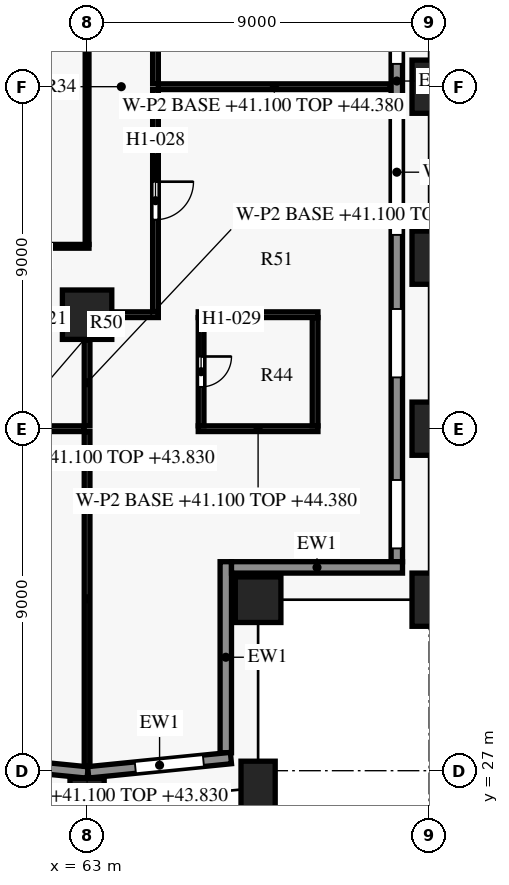
"""IFC4 building model, lengths in metres.
Left out: names, types, materials, properties, quantities, classifications, styles, units other than length and angle.
Written with IfcOpenShell. Run it as: python <this file> out.ifc"""

import sys

from ifc_helpers import new_model, si_unit, direction, frame, frame_2d, origin, origin_2d, place, context, subcontext, project, spatial, rectangle, extrude, element, fill, save


model = new_model("IFC4")
c1 = context("Model", 3, precision=1e-05, world=origin(), true_north=direction((0.0, 1.0)))
c2 = subcontext(c1, "Body", "Model", "MODEL_VIEW")
j1 = project(units=[si_unit("LENGTHUNIT", "METRE"), si_unit("PLANEANGLEUNIT", "RADIAN")], contexts=[c1])
p1 = place(None, origin())
s1 = spatial("IfcSite", under=j1, at=p1, CompositionType="ELEMENT")
p2 = place(p1, origin())
s2 = spatial("IfcBuilding", under=s1, at=p2, CompositionType="ELEMENT")
p3 = place(p2, frame((0.0, 0.0, 41.1)))
s3 = spatial("IfcBuildingStorey", under=s2, at=p3, CompositionType="ELEMENT", Elevation=41.1)
for number, where, z_axis, x_axis in (
    (1, (63.0, 26.1, 0.0), (0.0, 0.0, 1.0), (1.0, 0.0, 0.0)),
    (2, (67.5, 26.55, 0.0), (0.0, 0.0, 1.0), (0.995, 0.1, 0.0)),
    (3, (72.0, 31.5, 0.0), (0.0, 0.0, 1.0), (0.0, 1.0, 0.0)),
    (4, (72.0, 36.0, 0.0), (0.0, 0.0, 1.0), (0.0, 1.0, 0.0)),
    (5, (72.0, 40.5, 0.0), (0.0, 0.0, 1.0), (0.0, 1.0, 0.0)),
    (6, (72.0, 45.0, 0.0), (0.0, 0.0, 1.0), (0.0, 1.0, 0.0)),
):
    element("IfcColumn", number, at=place(p3, frame(where, z_axis=z_axis, x_axis=x_axis)), inside=s3, PredefinedType="COLUMN", context=c2, shape_type="SweptSolid", body=[
        extrude(rectangle(XDim=0.9, YDim=1.4, at=origin_2d()), origin(), (0.0, 0.0, 1.0), 3.6),
    ])
p4 = place(p3, frame((67.5, 31.5, 0.0), z_axis=(0.0, 0.0, 1.0), x_axis=(1.0, 0.0, 0.0)))
e7 = element("IfcColumn", 7, at=p4, inside=s3, PredefinedType="COLUMN", context=c2, shape_type="SweptSolid", body=[
    extrude(rectangle(XDim=1.2, YDim=1.2, at=origin_2d()), origin(), (0.0, 0.0, 1.0), 3.6),
])
p5 = place(p3, frame((63.0, 39.0, 0.0), z_axis=(0.0, 0.0, 1.0), x_axis=(1.0, 0.0, 0.0)))
e8 = element("IfcColumn", 8, at=p5, inside=s3, PredefinedType="COLUMN", context=c2, shape_type="SweptSolid", body=[
    extrude(rectangle(XDim=1.3, YDim=1.3, at=origin_2d()), origin(), (0.0, 0.0, 1.0), 3.6),
])
p6 = place(p3, frame((63.015, 26.953, 0.0), z_axis=(0.0, 0.0, 1.0), x_axis=(-0.995035316196, 0.099522457379, 0.0)))
e9 = element("IfcWall", 9, at=p6, inside=s3, PredefinedType="SOLIDWALL", context=c2, shape_type="SweptSolid", body=[
    extrude(rectangle(XDim=9.03, YDim=0.3, at=frame_2d((4.515, 0.0))), origin(), (0.0, 0.0, 1.0), 2.95),
])
p7 = place(p6, frame((1.291, 0.0, 0.75)))
e10 = element("IfcOpeningElement", 10, at=p7, cuts=e9, PredefinedType="OPENING", context=c2, shape_type="SweptSolid", body=[
    extrude(rectangle(XDim=1.8, YDim=1.8, at=frame_2d((0.9, 0.9))), frame((0.0, 0.16, 0.0), z_axis=(0.0, -1.0, 0.0), x_axis=(1.0, 0.0, 0.0)), (0.0, 0.0, 1.0), 0.32),
])
p8 = place(p6, frame((5.064, 0.0, 0.15)))
e11 = element("IfcOpeningElement", 11, at=p8, cuts=e9, PredefinedType="OPENING", context=c2, shape_type="SweptSolid", body=[
    extrude(rectangle(XDim=3.3, YDim=2.4, at=frame_2d((1.65, 1.2))), frame((0.0, 0.16, 0.0), z_axis=(0.0, -1.0, 0.0), x_axis=(1.0, 0.0, 0.0)), (0.0, 0.0, 1.0), 0.32),
])
p9 = place(p3, frame((66.785, 27.333, 0.0), z_axis=(0.0, 0.0, 1.0), x_axis=(-0.995038471088, -0.099490909409, 0.0)))
e12 = element("IfcWall", 12, at=p9, inside=s3, PredefinedType="SOLIDWALL", context=c2, shape_type="SweptSolid", body=[
    extrude(rectangle(XDim=3.774, YDim=0.3, at=frame_2d((1.887, 0.0))), origin(), (0.0, 0.0, 1.0), 2.95),
])
p10 = place(p9, frame((0.728, 0.0, 0.75)))
e13 = element("IfcOpeningElement", 13, at=p10, cuts=e12, PredefinedType="OPENING", context=c2, shape_type="SweptSolid", body=[
    extrude(rectangle(XDim=1.8, YDim=1.8, at=frame_2d((0.9, 0.9))), frame((0.0, 0.16, 0.0), z_axis=(0.0, -1.0, 0.0), x_axis=(1.0, 0.0, 0.0)), (0.0, 0.0, 1.0), 0.32),
])
p11 = place(p3, frame((66.65, 32.5, 0.0), z_axis=(0.0, 0.0, 1.0), x_axis=(0.0, -1.0, 0.0)))
e14 = element("IfcWall", 14, at=p11, inside=s3, PredefinedType="SOLIDWALL", context=c2, shape_type="SweptSolid", body=[
    extrude(rectangle(XDim=5.029, YDim=0.3, at=frame_2d((2.514, 0.0))), origin(), (0.0, 0.0, 1.0), 2.95),
])
p12 = place(p3, frame((71.3, 32.35, 0.0), z_axis=(0.0, 0.0, 1.0), x_axis=(-1.0, 0.0, 0.0)))
e15 = element("IfcWall", 15, at=p12, inside=s3, PredefinedType="SOLIDWALL", context=c2, shape_type="SweptSolid", body=[
    extrude(rectangle(XDim=4.5, YDim=0.3, at=frame_2d((2.25, 0.0))), origin(), (0.0, 0.0, 1.0), 2.95),
])
p13 = place(p3, frame((71.15, 57.8, 0.0), z_axis=(0.0, 0.0, 1.0), x_axis=(0.0, -1.0, 0.0)))
e16 = element("IfcWall", 16, at=p13, inside=s3, PredefinedType="SOLIDWALL", context=c2, shape_type="SweptSolid", body=[
    extrude(rectangle(XDim=25.302, YDim=0.3, at=frame_2d((12.651, 0.0))), origin(), (0.0, 0.0, 1.0), 2.95),
])
p14 = place(p13, frame((0.65, 0.0, 0.75)))
e17 = element("IfcOpeningElement", 17, at=p14, cuts=e16, PredefinedType="OPENING", context=c2, shape_type="SweptSolid", body=[
    extrude(rectangle(XDim=1.8, YDim=1.8, at=frame_2d((0.9, 0.9))), frame((0.0, 0.16, 0.0), z_axis=(0.0, -1.0, 0.0), x_axis=(1.0, 0.0, 0.0)), (0.0, 0.0, 1.0), 0.32),
])
p15 = place(p13, frame((5.15, 0.0, 0.75)))
e18 = element("IfcOpeningElement", 18, at=p15, cuts=e16, PredefinedType="OPENING", context=c2, shape_type="SweptSolid", body=[
    extrude(rectangle(XDim=1.8, YDim=1.8, at=frame_2d((0.9, 0.9))), frame((0.0, 0.16, 0.0), z_axis=(0.0, -1.0, 0.0), x_axis=(1.0, 0.0, 0.0)), (0.0, 0.0, 1.0), 0.32),
])
p16 = place(p13, frame((8.9, 0.0, 0.15)))
e19 = element("IfcOpeningElement", 19, at=p16, cuts=e16, PredefinedType="OPENING", context=c2, shape_type="SweptSolid", body=[
    extrude(rectangle(XDim=3.3, YDim=2.4, at=frame_2d((1.65, 1.2))), frame((0.0, 0.16, 0.0), z_axis=(0.0, -1.0, 0.0), x_axis=(1.0, 0.0, 0.0)), (0.0, 0.0, 1.0), 0.32),
])
p17 = place(p13, frame((13.4, 0.0, 0.15)))
e20 = element("IfcOpeningElement", 20, at=p17, cuts=e16, PredefinedType="OPENING", context=c2, shape_type="SweptSolid", body=[
    extrude(rectangle(XDim=3.3, YDim=2.4, at=frame_2d((1.65, 1.2))), frame((0.0, 0.16, 0.0), z_axis=(0.0, -1.0, 0.0), x_axis=(1.0, 0.0, 0.0)), (0.0, 0.0, 1.0), 0.32),
])
p18 = place(p13, frame((18.65, 0.0, 0.75)))
e21 = element("IfcOpeningElement", 21, at=p18, cuts=e16, PredefinedType="OPENING", context=c2, shape_type="SweptSolid", body=[
    extrude(rectangle(XDim=1.8, YDim=1.8, at=frame_2d((0.9, 0.9))), frame((0.0, 0.16, 0.0), z_axis=(0.0, -1.0, 0.0), x_axis=(1.0, 0.0, 0.0)), (0.0, 0.0, 1.0), 0.32),
])
p19 = place(p13, frame((23.15, 0.0, 0.75)))
e22 = element("IfcOpeningElement", 22, at=p19, cuts=e16, PredefinedType="OPENING", context=c2, shape_type="SweptSolid", body=[
    extrude(rectangle(XDim=1.8, YDim=1.8, at=frame_2d((0.9, 0.9))), frame((0.0, 0.16, 0.0), z_axis=(0.0, -1.0, 0.0), x_axis=(1.0, 0.0, 0.0)), (0.0, 0.0, 1.0), 0.32),
])
p20 = place(p3, frame((63.0, 35.925, 0.0), z_axis=(0.0, 0.0, 1.0), x_axis=(0.0, -1.0, 0.0)))
e23 = element("IfcWall", 23, at=p20, inside=s3, PredefinedType="PARTITIONING", context=c2, shape_type="SweptSolid", body=[
    extrude(rectangle(XDim=8.8, YDim=0.15, at=frame_2d((4.4, 0.0))), origin(), (0.0, 0.0, 1.0), 2.73),
])
p21 = place(p3, frame((60.825, 36.0, 0.0), z_axis=(0.0, 0.0, 1.0), x_axis=(1.0, 0.0, 0.0)))
e24 = element("IfcWall", 24, at=p21, inside=s3, PredefinedType="PARTITIONING", context=c2, shape_type="SweptSolid", body=[
    extrude(rectangle(XDim=2.1, YDim=0.15, at=frame_2d((1.05, 0.0))), origin(), (0.0, 0.0, 1.0), 2.73),
])
p22 = place(p3, frame((65.925, 36.0, 0.0), z_axis=(0.0, 0.0, 1.0), x_axis=(1.0, 0.0, 0.0)))
e25 = element("IfcWall", 25, at=p22, inside=s3, PredefinedType="PARTITIONING", context=c2, shape_type="SweptSolid", body=[
    extrude(rectangle(XDim=3.15, YDim=0.15, at=frame_2d((1.575, 0.0))), origin(), (0.0, 0.0, 1.0), 3.28),
])
p23 = place(p3, frame((69.0, 36.075, 0.0), z_axis=(0.0, 0.0, 1.0), x_axis=(0.0, 1.0, 0.0)))
e26 = element("IfcWall", 26, at=p23, inside=s3, PredefinedType="PARTITIONING", context=c2, shape_type="SweptSolid", body=[
    extrude(rectangle(XDim=2.85, YDim=0.15, at=frame_2d((1.425, 0.0))), origin(), (0.0, 0.0, 1.0), 2.58),
])
p24 = place(p3, frame((63.0, 38.345, 0.0), z_axis=(0.0, 0.0, 1.0), x_axis=(0.0, -1.0, 0.0)))
e27 = element("IfcWall", 27, at=p24, inside=s3, PredefinedType="PARTITIONING", context=c2, shape_type="SweptSolid", body=[
    extrude(rectangle(XDim=2.27, YDim=0.15, at=frame_2d((1.135, 0.0))), origin(), (0.0, 0.0, 1.0), 2.73),
])
p25 = place(p3, frame((66.0, 38.925, 0.0), z_axis=(0.0, 0.0, 1.0), x_axis=(0.0, -1.0, 0.0)))
e28 = element("IfcWall", 28, at=p25, inside=s3, PredefinedType="PARTITIONING", context=c2, shape_type="SweptSolid", body=[
    extrude(rectangle(XDim=2.85, YDim=0.15, at=frame_2d((1.425, 0.0))), origin(), (0.0, 0.0, 1.0), 2.58),
])
p26 = place(p25, frame((1.025, 0.0, 0.0)))
e29 = element("IfcOpeningElement", 29, at=p26, cuts=e28, PredefinedType="OPENING", context=c2, shape_type="SweptSolid", body=[
    extrude(rectangle(XDim=0.8, YDim=2.1, at=frame_2d((0.4, 1.05))), frame((0.0, 0.085, 0.0), z_axis=(0.0, -1.0, 0.0), x_axis=(1.0, 0.0, 0.0)), (0.0, 0.0, 1.0), 0.17),
])
p27 = place(p3, frame((62.345, 39.0, 0.0), z_axis=(0.0, 0.0, 1.0), x_axis=(-1.0, 0.0, 0.0)))
e30 = element("IfcWall", 30, at=p27, inside=s3, PredefinedType="PARTITIONING", context=c2, shape_type="SweptSolid", body=[
    extrude(rectangle(XDim=1.445, YDim=0.15, at=frame_2d((0.723, 0.0))), origin(), (0.0, 0.0, 1.0), 2.58),
])
p28 = place(p3, frame((64.875, 39.0, 0.0), z_axis=(0.0, 0.0, 1.0), x_axis=(-1.0, 0.0, 0.0)))
e31 = element("IfcWall", 31, at=p28, inside=s3, PredefinedType="PARTITIONING", context=c2, shape_type="SweptSolid", body=[
    extrude(rectangle(XDim=1.22, YDim=0.15, at=frame_2d((0.61, 0.0))), origin(), (0.0, 0.0, 1.0), 2.58),
])
p29 = place(p3, frame((69.075, 39.0, 0.0), z_axis=(0.0, 0.0, 1.0), x_axis=(-1.0, 0.0, 0.0)))
e32 = element("IfcWall", 32, at=p29, inside=s3, PredefinedType="PARTITIONING", context=c2, shape_type="SweptSolid", body=[
    extrude(rectangle(XDim=3.15, YDim=0.15, at=frame_2d((1.575, 0.0))), origin(), (0.0, 0.0, 1.0), 2.58),
])
p30 = place(p3, frame((59.7, 40.8, 0.0), z_axis=(0.0, 0.0, 1.0), x_axis=(1.0, 0.0, 0.0)))
e33 = element("IfcWall", 33, at=p30, inside=s3, PredefinedType="PARTITIONING", context=c2, shape_type="SweptSolid", body=[
    extrude(rectangle(XDim=3.35, YDim=0.1, at=frame_2d((1.675, 0.0))), origin(), (0.0, 0.0, 1.0), 2.73),
])
p31 = place(p3, frame((63.0, 40.85, 0.0), z_axis=(0.0, 0.0, 1.0), x_axis=(0.0, 1.0, 0.0)))
e34 = element("IfcWall", 34, at=p31, inside=s3, PredefinedType="PARTITIONING", context=c2, shape_type="SweptSolid", body=[
    extrude(rectangle(XDim=8.3, YDim=0.1, at=frame_2d((4.15, 0.0))), origin(), (0.0, 0.0, 1.0), 2.73),
])
p32 = place(p3, frame((64.8, 44.925, 0.0), z_axis=(0.0, 0.0, 1.0), x_axis=(0.0, -1.0, 0.0)))
e35 = element("IfcWall", 35, at=p32, inside=s3, PredefinedType="PARTITIONING", context=c2, shape_type="SweptSolid", body=[
    extrude(rectangle(XDim=5.85, YDim=0.15, at=frame_2d((2.925, 0.0))), origin(), (0.0, 0.0, 1.0), 2.58),
])
p33 = place(p32, frame((2.425, 0.0, 0.0)))
e36 = element("IfcOpeningElement", 36, at=p33, cuts=e35, PredefinedType="OPENING", context=c2, shape_type="SweptSolid", body=[
    extrude(rectangle(XDim=1.0, YDim=2.1, at=frame_2d((0.5, 1.05))), frame((0.0, 0.085, 0.0), z_axis=(0.0, -1.0, 0.0), x_axis=(1.0, 0.0, 0.0)), (0.0, 0.0, 1.0), 0.17),
])
p34 = place(p3, frame((70.98, 45.0, 0.0), z_axis=(0.0, 0.0, 1.0), x_axis=(-1.0, 0.0, 0.0)))
e37 = element("IfcWall", 37, at=p34, inside=s3, PredefinedType="PARTITIONING", context=c2, shape_type="SweptSolid", body=[
    extrude(rectangle(XDim=6.105, YDim=0.15, at=frame_2d((3.052, 0.0))), origin(), (0.0, 0.0, 1.0), 3.28),
])
p35 = place(p3, frame((64.8, 50.925, 0.0), z_axis=(0.0, 0.0, 1.0), x_axis=(0.0, -1.0, 0.0)))
e38 = element("IfcWall", 38, at=p35, inside=s3, PredefinedType="PARTITIONING", context=c2, shape_type="SweptSolid", body=[
    extrude(rectangle(XDim=5.85, YDim=0.15, at=frame_2d((2.925, 0.0))), origin(), (0.0, 0.0, 1.0), 2.58),
])
p36 = place(p35, frame((2.425, 0.0, 0.0)))
e39 = element("IfcOpeningElement", 39, at=p36, cuts=e38, PredefinedType="OPENING", context=c2, shape_type="SweptSolid", body=[
    extrude(rectangle(XDim=1.0, YDim=2.1, at=frame_2d((0.5, 1.05))), frame((0.0, 0.085, 0.0), z_axis=(0.0, -1.0, 0.0), x_axis=(1.0, 0.0, 0.0)), (0.0, 0.0, 1.0), 0.17),
])
p37 = place(p10, origin())
e40 = element("IfcWindow", 40, at=p37, inside=s3, PartitioningType="SINGLE_PANEL", PredefinedType="WINDOW", context=c2, shape_type="SweptSolid", body=[
    extrude(rectangle(XDim=1.8, YDim=1.8, at=frame_2d((0.9, 0.9))), frame((0.0, 0.03, 0.0), z_axis=(0.0, -1.0, 0.0), x_axis=(1.0, 0.0, 0.0)), (0.0, 0.0, 1.0), 0.06),
])
fill(e13, e40)
p38 = place(p16, origin())
e41 = element("IfcWindow", 41, at=p38, inside=s3, PartitioningType="SINGLE_PANEL", PredefinedType="WINDOW", context=c2, shape_type="SweptSolid", body=[
    extrude(rectangle(XDim=3.3, YDim=2.4, at=frame_2d((1.65, 1.2))), frame((0.0, 0.03, 0.0), z_axis=(0.0, -1.0, 0.0), x_axis=(1.0, 0.0, 0.0)), (0.0, 0.0, 1.0), 0.06),
])
fill(e19, e41)
p39 = place(p17, origin())
e42 = element("IfcWindow", 42, at=p39, inside=s3, PartitioningType="SINGLE_PANEL", PredefinedType="WINDOW", context=c2, shape_type="SweptSolid", body=[
    extrude(rectangle(XDim=3.3, YDim=2.4, at=frame_2d((1.65, 1.2))), frame((0.0, 0.03, 0.0), z_axis=(0.0, -1.0, 0.0), x_axis=(1.0, 0.0, 0.0)), (0.0, 0.0, 1.0), 0.06),
])
fill(e20, e42)
p40 = place(p18, origin())
e43 = element("IfcWindow", 43, at=p40, inside=s3, PartitioningType="SINGLE_PANEL", PredefinedType="WINDOW", context=c2, shape_type="SweptSolid", body=[
    extrude(rectangle(XDim=1.8, YDim=1.8, at=frame_2d((0.9, 0.9))), frame((0.0, 0.03, 0.0), z_axis=(0.0, -1.0, 0.0), x_axis=(1.0, 0.0, 0.0)), (0.0, 0.0, 1.0), 0.06),
])
fill(e21, e43)
p41 = place(p19, origin())
e44 = element("IfcWindow", 44, at=p41, inside=s3, PartitioningType="SINGLE_PANEL", PredefinedType="WINDOW", context=c2, shape_type="SweptSolid", body=[
    extrude(rectangle(XDim=1.8, YDim=1.8, at=frame_2d((0.9, 0.9))), frame((0.0, 0.03, 0.0), z_axis=(0.0, -1.0, 0.0), x_axis=(1.0, 0.0, 0.0)), (0.0, 0.0, 1.0), 0.06),
])
fill(e22, e44)
p42 = place(p33, origin())
e45 = element("IfcDoor", 45, at=p42, inside=s3, OperationType="SINGLE_SWING_LEFT", PredefinedType="DOOR", context=c2, shape_type="SweptSolid", body=[
    extrude(rectangle(XDim=1.0, YDim=2.1, at=frame_2d((0.5, 1.05))), frame((0.0, 0.025, 0.0), z_axis=(0.0, -1.0, 0.0), x_axis=(1.0, 0.0, 0.0)), (0.0, 0.0, 1.0), 0.05),
])
fill(e36, e45)
p43 = place(p26, origin())
e46 = element("IfcDoor", 46, at=p43, inside=s3, OperationType="SINGLE_SWING_RIGHT", PredefinedType="DOOR", context=c2, shape_type="SweptSolid", body=[
    extrude(rectangle(XDim=0.8, YDim=2.1, at=frame_2d((0.4, 1.05))), frame((0.0, 0.025, 0.0), z_axis=(0.0, -1.0, 0.0), x_axis=(1.0, 0.0, 0.0)), (0.0, 0.0, 1.0), 0.05),
])
fill(e29, e46)
save(model, sys.argv[1])
